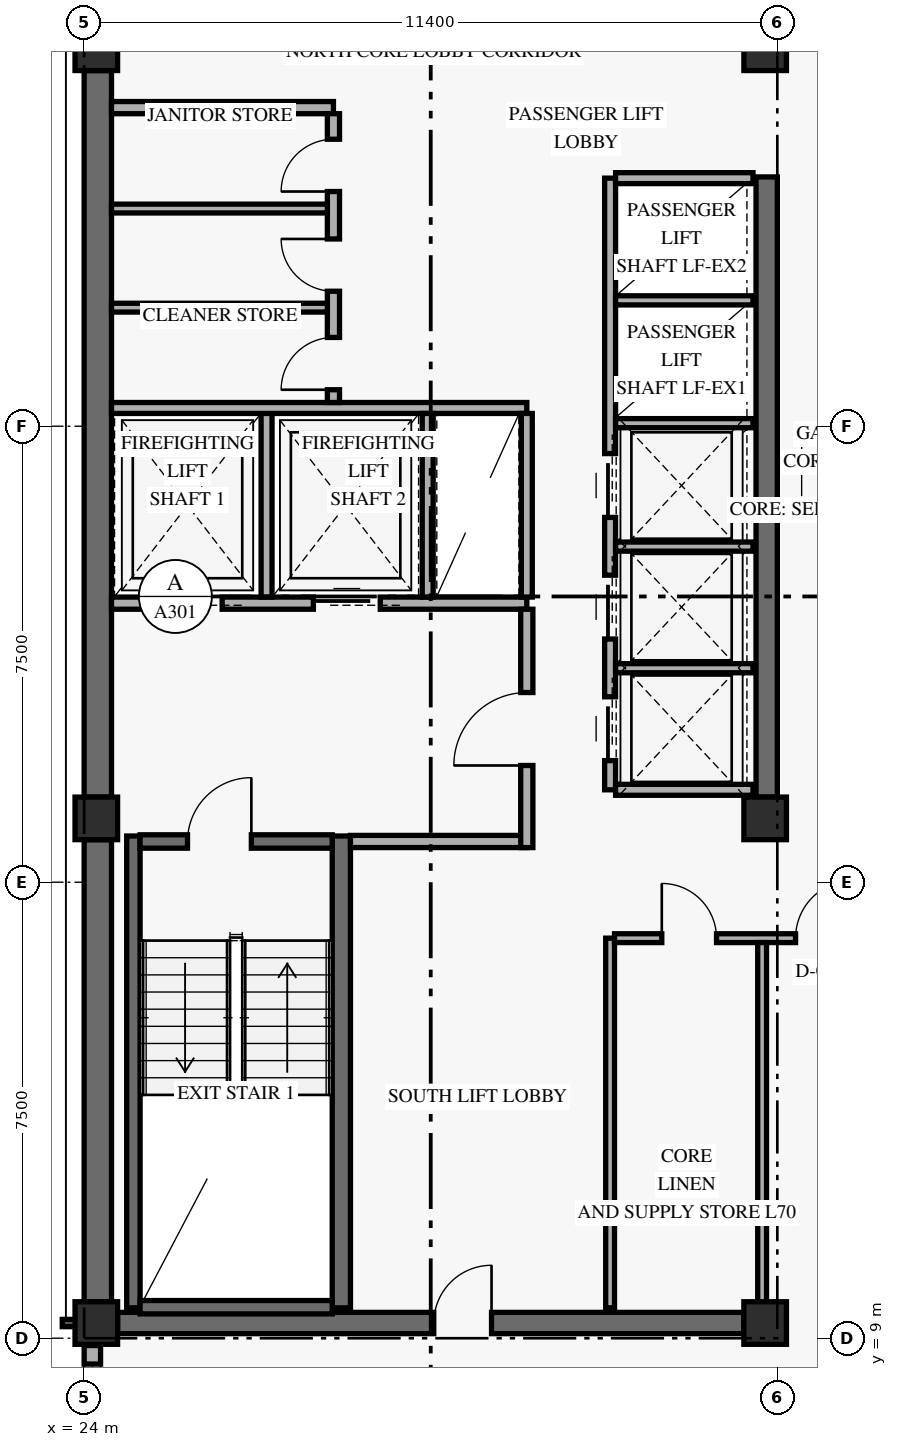
"""IFC4 building model, lengths in metres.
Left out: names, types, materials, properties, quantities, classifications, styles, units other than length and angle.
Written with IfcOpenShell. Run it as: python <this file> out.ifc"""

import sys

from ifc_helpers import new_model, si_unit, direction, frame, frame_2d, origin, origin_2d, place, context, subcontext, project, spatial, rectangle, extrude, element, fill, save


model = new_model("IFC4")
c1 = context("Model", 3, precision=1e-05, world=origin(), true_north=direction((0.0, 1.0)))
c2 = subcontext(c1, "Body", "Model", "MODEL_VIEW")
j1 = project(units=[si_unit("LENGTHUNIT", "METRE"), si_unit("PLANEANGLEUNIT", "RADIAN")], contexts=[c1])
p1 = place(None, origin())
s1 = spatial("IfcSite", under=j1, at=p1, CompositionType="ELEMENT")
p2 = place(p1, origin())
s2 = spatial("IfcBuilding", under=s1, at=p2, CompositionType="ELEMENT")
p3 = place(p2, frame((0.0, 0.0, 267.6)))
s3 = spatial("IfcBuildingStorey", under=s2, at=p3, CompositionType="ELEMENT", Elevation=267.6)
p4 = place(p3, frame((24.225, 9.6, 0.0), z_axis=(0.0, 0.0, 1.0), x_axis=(0.0, 1.0, 0.0)))
e1 = element("IfcWall", 1, at=p4, inside=s3, PredefinedType="SHEAR", context=c2, shape_type="SweptSolid", body=[
    extrude(rectangle(XDim=7.6, YDim=0.45, at=frame_2d((3.8, 0.0))), origin(), (0.0, 0.0, 1.0), 2.821),
])
p5 = place(p3, frame((24.225, 17.9, 0.0), z_axis=(0.0, 0.0, 1.0), x_axis=(0.0, 1.0, 0.0)))
e2 = element("IfcWall", 2, at=p5, inside=s3, PredefinedType="SHEAR", context=c2, shape_type="SweptSolid", body=[
    extrude(rectangle(XDim=11.95, YDim=0.45, at=frame_2d((5.975, 0.0))), origin(), (0.0, 0.0, 1.0), 2.821),
])
p6 = place(p3, frame((35.225, 17.9, 0.0), z_axis=(0.0, 0.0, 1.0), x_axis=(0.0, 1.0, 0.0)))
e3 = element("IfcWall", 3, at=p6, inside=s3, PredefinedType="SHEAR", context=c2, shape_type="SweptSolid", body=[
    extrude(rectangle(XDim=10.2, YDim=0.35, at=frame_2d((5.1, 0.0))), origin(), (0.0, 0.0, 1.0), 2.821),
])
p7 = place(p3, frame((24.55, 9.25, 0.0), z_axis=(0.0, 0.0, 1.0), x_axis=(1.0, 0.0, 0.0)))
e4 = element("IfcWall", 4, at=p7, inside=s3, PredefinedType="SHEAR", context=c2, shape_type="SweptSolid", body=[
    extrude(rectangle(XDim=10.3, YDim=0.35, at=frame_2d((5.15, 0.0))), origin(), (0.0, 0.0, 1.0), 3.36),
])
p8 = place(p7, frame((5.2, 0.0, 0.0)))
e5 = element("IfcOpeningElement", 5, at=p8, cuts=e4, PredefinedType="OPENING", context=c2, shape_type="SweptSolid", body=[
    extrude(rectangle(XDim=0.95, YDim=2.15, at=frame_2d((0.475, 1.075))), frame((0.0, 0.185, 0.0), z_axis=(0.0, -1.0, 0.0), x_axis=(1.0, 0.0, 0.0)), (0.0, 0.0, 1.0), 0.37),
])
p9 = place(p3, frame((24.81, 9.5, 0.0), z_axis=(0.0, 0.0, 1.0), x_axis=(0.0, 1.0, 0.0)))
e6 = element("IfcWall", 6, at=p9, inside=s3, PredefinedType="SHEAR", context=c2, shape_type="SweptSolid", body=[
    extrude(rectangle(XDim=7.76, YDim=0.22, at=frame_2d((3.88, 0.0))), origin(), (0.0, 0.0, 1.0), 3.36),
])
p10 = place(p3, frame((28.23, 9.5, 0.0), z_axis=(0.0, 0.0, 1.0), x_axis=(0.0, 1.0, 0.0)))
e7 = element("IfcWall", 7, at=p10, inside=s3, PredefinedType="SHEAR", context=c2, shape_type="SweptSolid", body=[
    extrude(rectangle(XDim=7.76, YDim=0.3, at=frame_2d((3.88, 0.0))), origin(), (0.0, 0.0, 1.0), 3.36),
])
p11 = place(p3, frame((24.92, 9.51, 0.0), z_axis=(0.0, 0.0, 1.0), x_axis=(1.0, 0.0, 0.0)))
e8 = element("IfcWall", 8, at=p11, inside=s3, PredefinedType="SHEAR", context=c2, shape_type="SweptSolid", body=[
    extrude(rectangle(XDim=3.16, YDim=0.22, at=frame_2d((1.58, 0.0))), origin(), (0.0, 0.0, 1.0), 3.36),
])
p12 = place(p3, frame((24.92, 17.17, 0.0), z_axis=(0.0, 0.0, 1.0), x_axis=(1.0, 0.0, 0.0)))
e9 = element("IfcWall", 9, at=p12, inside=s3, PredefinedType="SHEAR", context=c2, shape_type="SweptSolid", body=[
    extrude(rectangle(XDim=3.16, YDim=0.22, at=frame_2d((1.58, 0.0))), origin(), (0.0, 0.0, 1.0), 3.36),
])
p13 = place(p12, frame((0.78, 0.0, 0.0)))
e10 = element("IfcOpeningElement", 10, at=p13, cuts=e9, PredefinedType="OPENING", context=c2, shape_type="SweptSolid", body=[
    extrude(rectangle(XDim=1.05, YDim=2.15, at=frame_2d((0.525, 1.075))), frame((0.0, 0.12, 0.0), z_axis=(0.0, -1.0, 0.0), x_axis=(1.0, 0.0, 0.0)), (0.0, 0.0, 1.0), 0.24),
])
for number, where, z_axis, x_axis in (
    (11, (24.2, 9.25, 0.0), (0.0, 0.0, 1.0), (1.0, 0.0, 0.0)),
    (12, (24.2, 17.55, 0.0), (0.0, 0.0, 1.0), (1.0, 0.0, 0.0)),
    (13, (24.2, 30.2, 0.0), (0.0, 0.0, 1.0), (1.0, 0.0, 0.0)),
    (14, (35.2, 9.25, 0.0), (0.0, 0.0, 1.0), (1.0, 0.0, 0.0)),
    (15, (35.2, 17.55, 0.0), (0.0, 0.0, 1.0), (1.0, 0.0, 0.0)),
    (16, (35.2, 30.2, 0.0), (0.0, 0.0, 1.0), (1.0, 0.0, 0.0)),
):
    element("IfcColumn", number, at=place(p3, frame(where, z_axis=z_axis, x_axis=x_axis)), inside=s3, PredefinedType="COLUMN", context=c2, shape_type="SweptSolid", body=[
        extrude(rectangle(XDim=0.7, YDim=0.7, at=origin_2d()), origin(), (0.0, 0.0, 1.0), 3.6),
    ])
p14 = place(p3, frame((24.135, 7.32, 0.0), z_axis=(0.0, 0.0, 1.0), x_axis=(0.0, 1.0, 0.0)))
e17 = element("IfcWall", 17, at=p14, inside=s3, PredefinedType="SOLIDWALL", context=c2, shape_type="SweptSolid", body=[
    extrude(rectangle(XDim=1.56, YDim=0.27, at=frame_2d((0.78, 0.0))), origin(), (0.0, 0.0, 1.0), 2.803),
])
p15 = place(p14, frame((0.305, 0.0, 0.85)))
e18 = element("IfcOpeningElement", 18, at=p15, cuts=e17, PredefinedType="OPENING", context=c2, shape_type="SweptSolid", body=[
    extrude(rectangle(XDim=0.95, YDim=1.5, at=frame_2d((0.475, 0.75))), frame((0.0, 0.145, 0.0), z_axis=(0.0, -1.0, 0.0), x_axis=(1.0, 0.0, 0.0)), (0.0, 0.0, 1.0), 0.29),
])
p16 = place(p3, frame((24.45, 21.09, 0.0), z_axis=(0.0, 0.0, 1.0), x_axis=(1.0, 0.0, 0.0)))
e19 = element("IfcWall", 19, at=p16, inside=s3, PredefinedType="STANDARD", context=c2, shape_type="SweptSolid", body=[
    extrude(rectangle(XDim=6.83, YDim=0.2, at=frame_2d((3.415, 0.0))), origin(), (0.0, 0.0, 1.0), 3.36),
])
p17 = place(p16, frame((0.72, 0.0, 0.0)))
e20 = element("IfcOpeningElement", 20, at=p17, cuts=e19, PredefinedType="OPENING", context=c2, shape_type="SweptSolid", body=[
    extrude(rectangle(XDim=1.1, YDim=2.2, at=frame_2d((0.55, 1.1))), frame((0.0, 0.11, 0.0), z_axis=(0.0, -1.0, 0.0), x_axis=(1.0, 0.0, 0.0)), (0.0, 0.0, 1.0), 0.22),
])
p18 = place(p16, frame((3.32, 0.0, 0.0)))
e21 = element("IfcOpeningElement", 21, at=p18, cuts=e19, PredefinedType="OPENING", context=c2, shape_type="SweptSolid", body=[
    extrude(rectangle(XDim=1.1, YDim=2.2, at=frame_2d((0.55, 1.1))), frame((0.0, 0.11, 0.0), z_axis=(0.0, -1.0, 0.0), x_axis=(1.0, 0.0, 0.0)), (0.0, 0.0, 1.0), 0.22),
])
p19 = place(p3, frame((28.38, 17.17, 0.0), z_axis=(0.0, 0.0, 1.0), x_axis=(1.0, 0.0, 0.0)))
e22 = element("IfcWall", 22, at=p19, inside=s3, PredefinedType="STANDARD", context=c2, shape_type="SweptSolid", body=[
    extrude(rectangle(XDim=2.9, YDim=0.2, at=frame_2d((1.45, 0.0))), origin(), (0.0, 0.0, 1.0), 3.36),
])
p20 = place(p3, frame((31.28, 17.07, 0.0), z_axis=(0.0, 0.0, 1.0), x_axis=(0.0, 1.0, 0.0)))
e23 = element("IfcWall", 23, at=p20, inside=s3, PredefinedType="STANDARD", context=c2, shape_type="SweptSolid", body=[
    extrude(rectangle(XDim=3.92, YDim=0.2, at=frame_2d((1.96, 0.0))), origin(), (0.0, 0.0, 1.0), 2.803),
])
p21 = place(p20, frame((1.35, 0.0, 0.0)))
e24 = element("IfcOpeningElement", 24, at=p21, cuts=e23, PredefinedType="OPENING", context=c2, shape_type="SweptSolid", body=[
    extrude(rectangle(XDim=1.2, YDim=2.15, at=frame_2d((0.6, 1.075))), frame((0.0, 0.11, 0.0), z_axis=(0.0, -1.0, 0.0), x_axis=(1.0, 0.0, 0.0)), (0.0, 0.0, 1.0), 0.22),
])
p22 = place(p3, frame((27.0, 21.19, 0.0), z_axis=(0.0, 0.0, 1.0), x_axis=(0.0, 1.0, 0.0)))
e25 = element("IfcWall", 25, at=p22, inside=s3, PredefinedType="STANDARD", context=c2, shape_type="SweptSolid", body=[
    extrude(rectangle(XDim=3.11, YDim=0.18, at=frame_2d((1.555, 0.0))), origin(), (0.0, 0.0, 1.0), 3.36),
])
p23 = place(p3, frame((24.45, 24.3, 0.0), z_axis=(0.0, 0.0, 1.0), x_axis=(1.0, 0.0, 0.0)))
e26 = element("IfcWall", 26, at=p23, inside=s3, PredefinedType="STANDARD", context=c2, shape_type="SweptSolid", body=[
    extrude(rectangle(XDim=6.83, YDim=0.18, at=frame_2d((3.415, 0.0))), origin(), (0.0, 0.0, 1.0), 3.36),
])
for number, where, z_axis, x_axis in (
    (27, (29.65, 21.19, 0.0), (0.0, 0.0, 1.0), (0.0, 1.0, 0.0)),
    (28, (31.28, 21.19, 0.0), (0.0, 0.0, 1.0), (0.0, 1.0, 0.0)),
):
    element("IfcWall", number, at=place(p3, frame(where, z_axis=z_axis, x_axis=x_axis)), inside=s3, PredefinedType="STANDARD", context=c2, shape_type="SweptSolid", body=[
        extrude(rectangle(XDim=3.02, YDim=0.18, at=frame_2d((1.51, 0.0))), origin(), (0.0, 0.0, 1.0), 3.36),
    ])
p24 = place(p3, frame((24.45, 29.24, 0.0), z_axis=(0.0, 0.0, 1.0), x_axis=(1.0, 0.0, 0.0)))
e29 = element("IfcWall", 29, at=p24, inside=s3, PredefinedType="STANDARD", context=c2, shape_type="SweptSolid", body=[
    extrude(rectangle(XDim=3.65, YDim=0.2, at=frame_2d((1.825, 0.0))), origin(), (0.0, 0.0, 1.0), 3.36),
])
p25 = place(p3, frame((28.1, 24.39, 0.0), z_axis=(0.0, 0.0, 1.0), x_axis=(0.0, 1.0, 0.0)))
e30 = element("IfcWall", 30, at=p25, inside=s3, PredefinedType="STANDARD", context=c2, shape_type="SweptSolid", body=[
    extrude(rectangle(XDim=4.75, YDim=0.2, at=frame_2d((2.375, 0.0))), origin(), (0.0, 0.0, 1.0), 3.36),
])
p26 = place(p25, frame((0.21, 0.0, 0.0)))
e31 = element("IfcOpeningElement", 31, at=p26, cuts=e30, PredefinedType="OPENING", context=c2, shape_type="SweptSolid", body=[
    extrude(rectangle(XDim=0.86, YDim=2.1, at=frame_2d((0.43, 1.05))), frame((0.0, 0.11, 0.0), z_axis=(0.0, -1.0, 0.0), x_axis=(1.0, 0.0, 0.0)), (0.0, 0.0, 1.0), 0.22),
])
p27 = place(p25, frame((1.83, 0.0, 0.0)))
e32 = element("IfcOpeningElement", 32, at=p27, cuts=e30, PredefinedType="OPENING", context=c2, shape_type="SweptSolid", body=[
    extrude(rectangle(XDim=0.86, YDim=2.1, at=frame_2d((0.43, 1.05))), frame((0.0, 0.11, 0.0), z_axis=(0.0, -1.0, 0.0), x_axis=(1.0, 0.0, 0.0)), (0.0, 0.0, 1.0), 0.22),
])
p28 = place(p25, frame((3.47, 0.0, 0.0)))
e33 = element("IfcOpeningElement", 33, at=p28, cuts=e30, PredefinedType="OPENING", context=c2, shape_type="SweptSolid", body=[
    extrude(rectangle(XDim=0.86, YDim=2.1, at=frame_2d((0.43, 1.05))), frame((0.0, 0.11, 0.0), z_axis=(0.0, -1.0, 0.0), x_axis=(1.0, 0.0, 0.0)), (0.0, 0.0, 1.0), 0.22),
])
for number, where, z_axis, x_axis in (
    (34, (24.45, 25.95, 0.0), (0.0, 0.0, 1.0), (1.0, 0.0, 0.0)),
    (35, (24.45, 27.58, 0.0), (0.0, 0.0, 1.0), (1.0, 0.0, 0.0)),
):
    element("IfcWall", number, at=place(p3, frame(where, z_axis=z_axis, x_axis=x_axis)), inside=s3, PredefinedType="PARTITIONING", context=c2, shape_type="SweptSolid", body=[
        extrude(rectangle(XDim=3.55, YDim=0.145, at=frame_2d((1.775, 0.0))), origin(), (0.0, 0.0, 1.0), 3.36),
    ])
p29 = place(p3, frame((32.65, 18.02, 0.0), z_axis=(0.0, 0.0, 1.0), x_axis=(0.0, 1.0, 0.0)))
e36 = element("IfcWall", 36, at=p29, inside=s3, PredefinedType="STANDARD", context=c2, shape_type="SweptSolid", body=[
    extrude(rectangle(XDim=10.06, YDim=0.18, at=frame_2d((5.03, 0.0))), origin(), (0.0, 0.0, 1.0), 3.36),
])
p30 = place(p29, frame((0.48, 0.0, 0.0)))
e37 = element("IfcOpeningElement", 37, at=p30, cuts=e36, PredefinedType="OPENING", context=c2, shape_type="SweptSolid", body=[
    extrude(rectangle(XDim=1.05, YDim=2.2, at=frame_2d((0.525, 1.1))), frame((0.0, 0.1, 0.0), z_axis=(0.0, -1.0, 0.0), x_axis=(1.0, 0.0, 0.0)), (0.0, 0.0, 1.0), 0.2),
])
p31 = place(p29, frame((2.48, 0.0, 0.0)))
e38 = element("IfcOpeningElement", 38, at=p31, cuts=e36, PredefinedType="OPENING", context=c2, shape_type="SweptSolid", body=[
    extrude(rectangle(XDim=1.05, YDim=2.2, at=frame_2d((0.525, 1.1))), frame((0.0, 0.1, 0.0), z_axis=(0.0, -1.0, 0.0), x_axis=(1.0, 0.0, 0.0)), (0.0, 0.0, 1.0), 0.2),
])
p32 = place(p29, frame((4.48, 0.0, 0.0)))
e39 = element("IfcOpeningElement", 39, at=p32, cuts=e36, PredefinedType="OPENING", context=c2, shape_type="SweptSolid", body=[
    extrude(rectangle(XDim=1.05, YDim=2.2, at=frame_2d((0.525, 1.1))), frame((0.0, 0.1, 0.0), z_axis=(0.0, -1.0, 0.0), x_axis=(1.0, 0.0, 0.0)), (0.0, 0.0, 1.0), 0.2),
])
for number, where, z_axis, x_axis in (
    (40, (32.74, 18.02, 0.0), (0.0, 0.0, 1.0), (1.0, 0.0, 0.0)),
    (41, (32.74, 28.08, 0.0), (0.0, 0.0, 1.0), (1.0, 0.0, 0.0)),
):
    element("IfcWall", number, at=place(p3, frame(where, z_axis=z_axis, x_axis=x_axis)), inside=s3, PredefinedType="STANDARD", context=c2, shape_type="SweptSolid", body=[
        extrude(rectangle(XDim=2.26, YDim=0.18, at=frame_2d((1.13, 0.0))), origin(), (0.0, 0.0, 1.0), 3.36),
    ])
for number, where, z_axis, x_axis in (
    (42, (32.74, 20.02, 0.0), (0.0, 0.0, 1.0), (1.0, 0.0, 0.0)),
    (43, (32.74, 22.02, 0.0), (0.0, 0.0, 1.0), (1.0, 0.0, 0.0)),
    (44, (32.74, 24.05, 0.0), (0.0, 0.0, 1.0), (1.0, 0.0, 0.0)),
    (45, (32.74, 26.07, 0.0), (0.0, 0.0, 1.0), (1.0, 0.0, 0.0)),
):
    element("IfcWall", number, at=place(p3, frame(where, z_axis=z_axis, x_axis=x_axis)), inside=s3, PredefinedType="STANDARD", context=c2, shape_type="SweptSolid", body=[
        extrude(rectangle(XDim=2.26, YDim=0.15, at=frame_2d((1.13, 0.0))), origin(), (0.0, 0.0, 1.0), 3.36),
    ])
p33 = place(p3, frame((32.65, 9.5, 0.0), z_axis=(0.0, 0.0, 1.0), x_axis=(0.0, 1.0, 0.0)))
e46 = element("IfcWall", 46, at=p33, inside=s3, PredefinedType="PARTITIONING", context=c2, shape_type="SweptSolid", body=[
    extrude(rectangle(XDim=6.08, YDim=0.145, at=frame_2d((3.04, 0.0))), origin(), (0.0, 0.0, 1.0), 3.36),
])
p34 = place(p3, frame((32.722, 15.58, 0.0), z_axis=(0.0, 0.0, 1.0), x_axis=(1.0, 0.0, 0.0)))
e47 = element("IfcWall", 47, at=p34, inside=s3, PredefinedType="PARTITIONING", context=c2, shape_type="SweptSolid", body=[
    extrude(rectangle(XDim=4.828, YDim=0.145, at=frame_2d((2.414, 0.0))), origin(), (0.0, 0.0, 1.0), 2.803),
])
p35 = place(p34, frame((0.778, 0.0, 0.0)))
e48 = element("IfcOpeningElement", 48, at=p35, cuts=e47, PredefinedType="OPENING", context=c2, shape_type="SweptSolid", body=[
    extrude(rectangle(XDim=0.9, YDim=2.1, at=frame_2d((0.45, 1.05))), frame((0.0, 0.083, 0.0), z_axis=(0.0, -1.0, 0.0), x_axis=(1.0, 0.0, 0.0)), (0.0, 0.0, 1.0), 0.165),
])
p36 = place(p34, frame((2.978, 0.0, 0.0)))
e49 = element("IfcOpeningElement", 49, at=p36, cuts=e47, PredefinedType="OPENING", context=c2, shape_type="SweptSolid", body=[
    extrude(rectangle(XDim=0.95, YDim=2.15, at=frame_2d((0.475, 1.075))), frame((0.0, 0.083, 0.0), z_axis=(0.0, -1.0, 0.0), x_axis=(1.0, 0.0, 0.0)), (0.0, 0.0, 1.0), 0.165),
])
p37 = place(p3, frame((35.15, 9.5, 0.0), z_axis=(0.0, 0.0, 1.0), x_axis=(0.0, 1.0, 0.0)))
e50 = element("IfcWall", 50, at=p37, inside=s3, PredefinedType="PARTITIONING", context=c2, shape_type="SweptSolid", body=[
    extrude(rectangle(XDim=6.008, YDim=0.145, at=frame_2d((3.004, 0.0))), origin(), (0.0, 0.0, 1.0), 2.803),
])
p38 = place(p15, origin())
e51 = element("IfcWindow", 51, at=p38, inside=s3, PartitioningType="SINGLE_PANEL", PredefinedType="WINDOW", context=c2, shape_type="SweptSolid", body=[
    extrude(rectangle(XDim=0.95, YDim=1.5, at=frame_2d((0.475, 0.75))), frame((0.0, 0.03, 0.0), z_axis=(0.0, -1.0, 0.0), x_axis=(1.0, 0.0, 0.0)), (0.0, 0.0, 1.0), 0.06),
])
fill(e18, e51)
p39 = place(p13, frame((1.05, 0.0, 0.0), z_axis=(0.0, 0.0, 1.0), x_axis=(-1.0, 0.0, 0.0)))
e52 = element("IfcDoor", 52, at=p39, inside=s3, OperationType="SINGLE_SWING_LEFT", PredefinedType="DOOR", context=c2, shape_type="SweptSolid", body=[
    extrude(rectangle(XDim=1.05, YDim=2.15, at=frame_2d((0.525, 1.075))), frame((0.0, 0.025, 0.0), z_axis=(0.0, -1.0, 0.0), x_axis=(1.0, 0.0, 0.0)), (0.0, 0.0, 1.0), 0.05),
])
fill(e10, e52)
p40 = place(p17, origin())
e53 = element("IfcDoor", 53, at=p40, inside=s3, OperationType="SLIDING_TO_LEFT", PredefinedType="DOOR", context=c2, shape_type="SweptSolid", body=[
    extrude(rectangle(XDim=1.1, YDim=2.2, at=frame_2d((0.55, 1.1))), frame((0.0, 0.025, 0.0), z_axis=(0.0, -1.0, 0.0), x_axis=(1.0, 0.0, 0.0)), (0.0, 0.0, 1.0), 0.05),
])
fill(e20, e53)
p41 = place(p18, origin())
e54 = element("IfcDoor", 54, at=p41, inside=s3, OperationType="SLIDING_TO_LEFT", PredefinedType="DOOR", context=c2, shape_type="SweptSolid", body=[
    extrude(rectangle(XDim=1.1, YDim=2.2, at=frame_2d((0.55, 1.1))), frame((0.0, 0.025, 0.0), z_axis=(0.0, -1.0, 0.0), x_axis=(1.0, 0.0, 0.0)), (0.0, 0.0, 1.0), 0.05),
])
fill(e21, e54)
p42 = place(p21, origin())
e55 = element("IfcDoor", 55, at=p42, inside=s3, OperationType="SINGLE_SWING_LEFT", PredefinedType="DOOR", context=c2, shape_type="SweptSolid", body=[
    extrude(rectangle(XDim=1.2, YDim=2.15, at=frame_2d((0.6, 1.075))), frame((0.0, 0.025, 0.0), z_axis=(0.0, -1.0, 0.0), x_axis=(1.0, 0.0, 0.0)), (0.0, 0.0, 1.0), 0.05),
])
fill(e24, e55)
p43 = place(p26, origin())
e56 = element("IfcDoor", 56, at=p43, inside=s3, OperationType="SINGLE_SWING_LEFT", PredefinedType="DOOR", context=c2, shape_type="SweptSolid", body=[
    extrude(rectangle(XDim=0.86, YDim=2.1, at=frame_2d((0.43, 1.05))), frame((0.0, 0.025, 0.0), z_axis=(0.0, -1.0, 0.0), x_axis=(1.0, 0.0, 0.0)), (0.0, 0.0, 1.0), 0.05),
])
fill(e31, e56)
p44 = place(p27, origin())
e57 = element("IfcDoor", 57, at=p44, inside=s3, OperationType="SINGLE_SWING_RIGHT", PredefinedType="DOOR", context=c2, shape_type="SweptSolid", body=[
    extrude(rectangle(XDim=0.86, YDim=2.1, at=frame_2d((0.43, 1.05))), frame((0.0, 0.025, 0.0), z_axis=(0.0, -1.0, 0.0), x_axis=(1.0, 0.0, 0.0)), (0.0, 0.0, 1.0), 0.05),
])
fill(e32, e57)
p45 = place(p28, origin())
e58 = element("IfcDoor", 58, at=p45, inside=s3, OperationType="SINGLE_SWING_LEFT", PredefinedType="DOOR", context=c2, shape_type="SweptSolid", body=[
    extrude(rectangle(XDim=0.86, YDim=2.1, at=frame_2d((0.43, 1.05))), frame((0.0, 0.025, 0.0), z_axis=(0.0, -1.0, 0.0), x_axis=(1.0, 0.0, 0.0)), (0.0, 0.0, 1.0), 0.05),
])
fill(e33, e58)
p46 = place(p30, origin())
e59 = element("IfcDoor", 59, at=p46, inside=s3, OperationType="SLIDING_TO_LEFT", PredefinedType="DOOR", context=c2, shape_type="SweptSolid", body=[
    extrude(rectangle(XDim=1.05, YDim=2.2, at=frame_2d((0.525, 1.1))), frame((0.0, 0.025, 0.0), z_axis=(0.0, -1.0, 0.0), x_axis=(1.0, 0.0, 0.0)), (0.0, 0.0, 1.0), 0.05),
])
fill(e37, e59)
p47 = place(p31, origin())
e60 = element("IfcDoor", 60, at=p47, inside=s3, OperationType="SLIDING_TO_LEFT", PredefinedType="DOOR", context=c2, shape_type="SweptSolid", body=[
    extrude(rectangle(XDim=1.05, YDim=2.2, at=frame_2d((0.525, 1.1))), frame((0.0, 0.025, 0.0), z_axis=(0.0, -1.0, 0.0), x_axis=(1.0, 0.0, 0.0)), (0.0, 0.0, 1.0), 0.05),
])
fill(e38, e60)
p48 = place(p32, origin())
e61 = element("IfcDoor", 61, at=p48, inside=s3, OperationType="SLIDING_TO_LEFT", PredefinedType="DOOR", context=c2, shape_type="SweptSolid", body=[
    extrude(rectangle(XDim=1.05, YDim=2.2, at=frame_2d((0.525, 1.1))), frame((0.0, 0.025, 0.0), z_axis=(0.0, -1.0, 0.0), x_axis=(1.0, 0.0, 0.0)), (0.0, 0.0, 1.0), 0.05),
])
fill(e39, e61)
p49 = place(p35, origin())
e62 = element("IfcDoor", 62, at=p49, inside=s3, OperationType="SINGLE_SWING_LEFT", PredefinedType="DOOR", context=c2, shape_type="SweptSolid", body=[
    extrude(rectangle(XDim=0.9, YDim=2.1, at=frame_2d((0.45, 1.05))), frame((0.0, 0.025, 0.0), z_axis=(0.0, -1.0, 0.0), x_axis=(1.0, 0.0, 0.0)), (0.0, 0.0, 1.0), 0.05),
])
fill(e48, e62)
p50 = place(p36, origin())
e63 = element("IfcDoor", 63, at=p50, inside=s3, OperationType="SINGLE_SWING_RIGHT", PredefinedType="DOOR", context=c2, shape_type="SweptSolid", body=[
    extrude(rectangle(XDim=0.95, YDim=2.15, at=frame_2d((0.475, 1.075))), frame((0.0, 0.025, 0.0), z_axis=(0.0, -1.0, 0.0), x_axis=(1.0, 0.0, 0.0)), (0.0, 0.0, 1.0), 0.05),
])
fill(e49, e63)
p51 = place(p8, frame((0.95, 0.0, 0.0), z_axis=(0.0, 0.0, 1.0), x_axis=(-1.0, 0.0, 0.0)))
e64 = element("IfcDoor", 64, at=p51, inside=s3, OperationType="SINGLE_SWING_LEFT", PredefinedType="DOOR", context=c2, shape_type="SweptSolid", body=[
    extrude(rectangle(XDim=0.95, YDim=2.15, at=frame_2d((0.475, 1.075))), frame((0.0, 0.025, 0.0), z_axis=(0.0, -1.0, 0.0), x_axis=(1.0, 0.0, 0.0)), (0.0, 0.0, 1.0), 0.05),
])
fill(e5, e64)
save(model, sys.argv[1])
